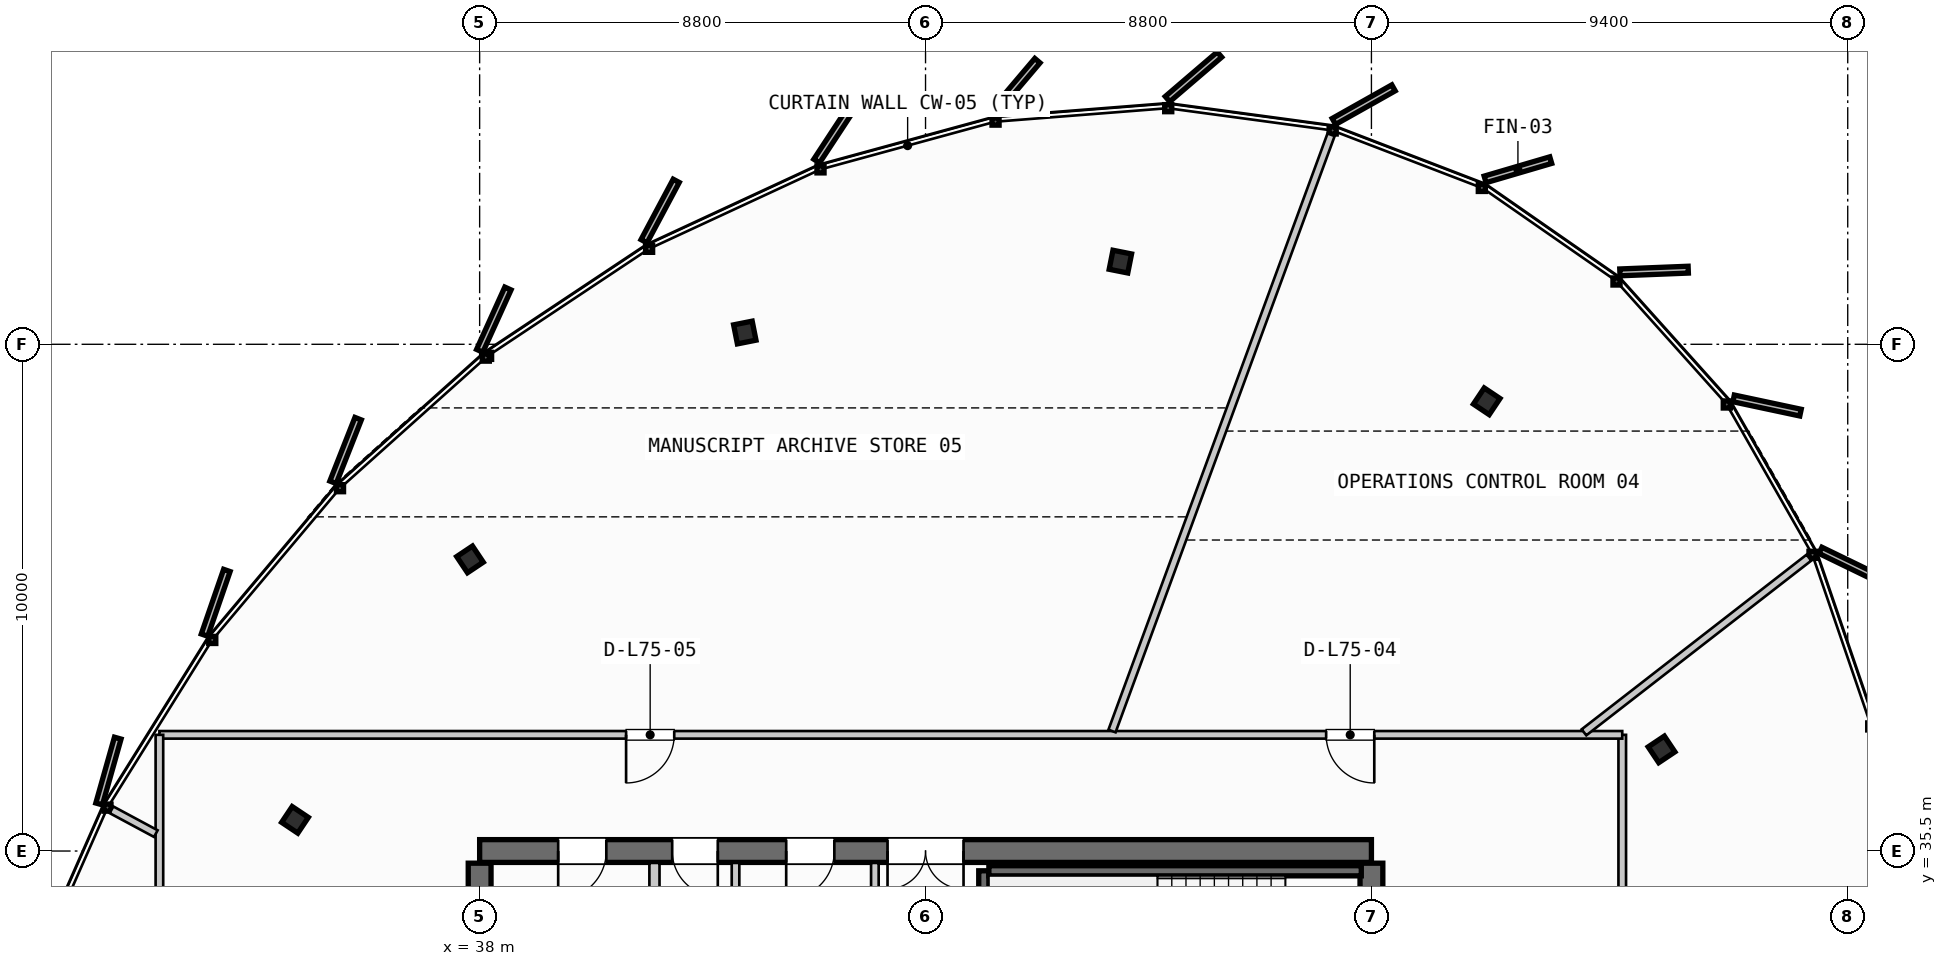
"""IFC4 building model, lengths in metres.
Left out: names, types, materials, properties, quantities, classifications, styles, units other than length and angle.
Written with IfcOpenShell. Run it as: python <this file> out.ifc"""

import sys

from ifc_helpers import new_model, si_unit, direction, frame, frame_2d, origin, origin_2d, place, context, subcontext, project, spatial, rectangle, i_section, extrude, source, transform, mapped, element, fill, save


model = new_model("IFC4")
c1 = context("Model", 3, precision=1e-05, world=origin(), true_north=direction((0.0, 1.0)))
c2 = subcontext(c1, "Body", "Model", "MODEL_VIEW")
j1 = project(units=[si_unit("LENGTHUNIT", "METRE"), si_unit("PLANEANGLEUNIT", "RADIAN")], contexts=[c1])
p1 = place(None, origin())
s1 = spatial("IfcSite", under=j1, at=p1, CompositionType="ELEMENT")
p2 = place(p1, origin())
s2 = spatial("IfcBuilding", under=s1, at=p2, CompositionType="ELEMENT")
p3 = place(p2, frame((0.0, 0.0, 283.6)))
s3 = spatial("IfcBuildingStorey", under=s2, at=p3, CompositionType="ELEMENT", Elevation=283.6)
p4 = place(p3, frame((55.6, 35.5, 0.0), z_axis=(0.0, 0.0, 1.0), x_axis=(-1.0, 0.0, 0.0)))
e1 = element("IfcWall", 1, at=p4, inside=s3, PredefinedType="SHEAR", context=c2, shape_type="SweptSolid", body=[
    extrude(rectangle(XDim=17.6, YDim=0.45, at=frame_2d((8.8, 0.0))), origin(), (0.0, 0.0, 1.0), 3.21),
])
p5 = place(p4, frame((8.05, 0.0, 0.0)))
e2 = element("IfcOpeningElement", 2, at=p5, cuts=e1, PredefinedType="OPENING", context=c2, shape_type="SweptSolid", body=[
    extrude(rectangle(XDim=1.5, YDim=2.2, at=frame_2d((0.75, 1.1))), frame((0.0, 0.235, 0.0), z_axis=(0.0, -1.0, 0.0), x_axis=(1.0, 0.0, 0.0)), (0.0, 0.0, 1.0), 0.47),
])
p6 = place(p4, frame((15.1, 0.0, 0.0)))
e3 = element("IfcOpeningElement", 3, at=p6, cuts=e1, PredefinedType="OPENING", context=c2, shape_type="SweptSolid", body=[
    extrude(rectangle(XDim=0.95, YDim=2.15, at=frame_2d((0.475, 1.075))), frame((0.0, 0.235, 0.0), z_axis=(0.0, -1.0, 0.0), x_axis=(1.0, 0.0, 0.0)), (0.0, 0.0, 1.0), 0.47),
])
p7 = place(p4, frame((12.9, 0.0, 0.0)))
e4 = element("IfcOpeningElement", 4, at=p7, cuts=e1, PredefinedType="OPENING", context=c2, shape_type="SweptSolid", body=[
    extrude(rectangle(XDim=0.9, YDim=2.15, at=frame_2d((0.45, 1.075))), frame((0.0, 0.235, 0.0), z_axis=(0.0, -1.0, 0.0), x_axis=(1.0, 0.0, 0.0)), (0.0, 0.0, 1.0), 0.47),
])
p8 = place(p4, frame((10.6, 0.0, 0.0)))
e5 = element("IfcOpeningElement", 5, at=p8, cuts=e1, PredefinedType="OPENING", context=c2, shape_type="SweptSolid", body=[
    extrude(rectangle(XDim=0.95, YDim=2.15, at=frame_2d((0.475, 1.075))), frame((0.0, 0.235, 0.0), z_axis=(0.0, -1.0, 0.0), x_axis=(1.0, 0.0, 0.0)), (0.0, 0.0, 1.0), 0.47),
])
p9 = place(p3, frame((38.0, 35.26, 0.0), z_axis=(0.0, 0.0, 1.0), x_axis=(0.0, -1.0, 0.0)))
e6 = element("IfcWall", 6, at=p9, inside=s3, PredefinedType="SHEAR", context=c2, shape_type="SweptSolid", body=[
    extrude(rectangle(XDim=14.92, YDim=0.45, at=frame_2d((7.46, 0.0))), origin(), (0.0, 0.0, 1.0), 3.21),
])
p10 = place(p9, frame((5.21, 0.0, 0.0)))
e7 = element("IfcOpeningElement", 7, at=p10, cuts=e6, PredefinedType="OPENING", context=c2, shape_type="SweptSolid", body=[
    extrude(rectangle(XDim=1.1, YDim=2.2, at=frame_2d((0.55, 1.1))), frame((0.0, 0.235, 0.0), z_axis=(0.0, -1.0, 0.0), x_axis=(1.0, 0.0, 0.0)), (0.0, 0.0, 1.0), 0.47),
])
p11 = place(p3, frame((55.6, 20.34, 0.0), z_axis=(0.0, 0.0, 1.0), x_axis=(0.0, 1.0, 0.0)))
e8 = element("IfcWall", 8, at=p11, inside=s3, PredefinedType="SHEAR", context=c2, shape_type="SweptSolid", body=[
    extrude(rectangle(XDim=14.92, YDim=0.45, at=frame_2d((7.46, 0.0))), origin(), (0.0, 0.0, 1.0), 3.21),
])
p12 = place(p11, frame((12.71, 0.0, 0.0)))
e9 = element("IfcOpeningElement", 9, at=p12, cuts=e8, PredefinedType="OPENING", context=c2, shape_type="SweptSolid", body=[
    extrude(rectangle(XDim=1.05, YDim=2.15, at=frame_2d((0.525, 1.075))), frame((0.0, 0.235, 0.0), z_axis=(0.0, -1.0, 0.0), x_axis=(1.0, 0.0, 0.0)), (0.0, 0.0, 1.0), 0.47),
])
p13 = place(p11, frame((8.61, 0.0, 0.0)))
e10 = element("IfcOpeningElement", 10, at=p13, cuts=e8, PredefinedType="OPENING", context=c2, shape_type="SweptSolid", body=[
    extrude(rectangle(XDim=1.1, YDim=2.2, at=frame_2d((0.55, 1.1))), frame((0.0, 0.235, 0.0), z_axis=(0.0, -1.0, 0.0), x_axis=(1.0, 0.0, 0.0)), (0.0, 0.0, 1.0), 0.47),
])
m1 = source(origin(), c2, "Body", "SweptSolid", [
    extrude(i_section(OverallWidth=0.374, OverallDepth=0.383, WebThickness=0.017, FlangeThickness=0.026, FilletRadius=0.015, at=origin_2d()), origin(), (0.0, 0.0, 1.0), 3.21),
])
for number, where, z_axis, x_axis in (
    (11, (61.326, 37.506, 0.0), (0.0, 0.0, 1.0), (0.831, 0.556, 0.0)),
    (12, (57.875, 44.375, 0.0), (0.0, 0.0, 1.0), (0.556, 0.831, 0.0)),
    (13, (50.645, 47.132, 0.0), (0.0, 0.0, 1.0), (0.195, 0.981, 0.0)),
    (14, (43.233, 45.732, 0.0), (0.0, 0.0, 1.0), (-0.195, 0.981, 0.0)),
    (15, (37.81, 41.255, 0.0), (0.0, 0.0, 1.0), (-0.556, 0.831, 0.0)),
    (16, (34.356, 36.115, 0.0), (0.0, 0.0, 1.0), (-0.831, 0.556, 0.0)),
):
    element("IfcColumn", number, at=place(p3, frame(where, z_axis=z_axis, x_axis=x_axis)), inside=s3, PredefinedType="COLUMN", context=c2, shape_type="MappedRepresentation", body=[
        mapped(m1, transform((0.0, 0.0, 0.0), scale=1.0)),
    ])
p14 = place(p3, frame((47.95, 32.05, 0.0), z_axis=(0.0, 0.0, 1.0), x_axis=(0.0, 1.0, 0.0)))
e17 = element("IfcWall", 17, at=p14, inside=s3, PredefinedType="SHEAR", context=c2, shape_type="SweptSolid", body=[
    extrude(rectangle(XDim=3.06, YDim=0.2, at=frame_2d((1.53, 0.0))), origin(), (0.0, 0.0, 1.0), 3.21),
])
p15 = place(p3, frame((48.05, 35.11, 0.0), z_axis=(0.0, 0.0, 1.0), x_axis=(1.0, 0.0, 0.0)))
e18 = element("IfcWall", 18, at=p15, inside=s3, PredefinedType="SHEAR", context=c2, shape_type="SweptSolid", body=[
    extrude(rectangle(XDim=7.35, YDim=0.2, at=frame_2d((3.675, 0.0))), origin(), (0.0, 0.0, 1.0), 3.21),
])
p16 = place(p3, frame((41.45, 31.85, 0.0), z_axis=(0.0, 0.0, 1.0), x_axis=(0.0, 1.0, 0.0)))
e19 = element("IfcWall", 19, at=p16, inside=s3, PredefinedType="PARTITIONING", context=c2, shape_type="SweptSolid", body=[
    extrude(rectangle(XDim=3.415, YDim=0.2, at=frame_2d((1.708, 0.0))), origin(), (0.0, 0.0, 1.0), 2.455),
])
p17 = place(p3, frame((45.8, 31.85, 0.0), z_axis=(0.0, 0.0, 1.0), x_axis=(0.0, 1.0, 0.0)))
e20 = element("IfcWall", 20, at=p17, inside=s3, PredefinedType="PARTITIONING", context=c2, shape_type="SweptSolid", body=[
    extrude(rectangle(XDim=3.415, YDim=0.15, at=frame_2d((1.708, 0.0))), origin(), (0.0, 0.0, 1.0), 2.455),
])
p18 = place(p3, frame((43.05, 31.85, 0.0), z_axis=(0.0, 0.0, 1.0), x_axis=(0.0, 1.0, 0.0)))
e21 = element("IfcWall", 21, at=p18, inside=s3, PredefinedType="PLUMBINGWALL", context=c2, shape_type="SweptSolid", body=[
    extrude(rectangle(XDim=3.415, YDim=0.15, at=frame_2d((1.708, 0.0))), origin(), (0.0, 0.0, 1.0), 2.455),
])
p19 = place(p3, frame((60.55, 17.807, 0.0), z_axis=(0.0, 0.0, 1.0), x_axis=(0.0, 1.0, 0.0)))
e22 = element("IfcWall", 22, at=p19, inside=s3, PredefinedType="PARTITIONING", context=c2, shape_type="SweptSolid", body=[
    extrude(rectangle(XDim=19.986, YDim=0.15, at=frame_2d((9.993, 0.0))), origin(), (0.0, 0.0, 1.0), 2.455),
])
p20 = place(p19, frame((2.877, 0.0, 0.0)))
e23 = element("IfcOpeningElement", 23, at=p20, cuts=e22, PredefinedType="OPENING", context=c2, shape_type="SweptSolid", body=[
    extrude(rectangle(XDim=0.95, YDim=2.15, at=frame_2d((0.475, 1.075))), frame((0.0, 0.085, 0.0), z_axis=(0.0, -1.0, 0.0), x_axis=(1.0, 0.0, 0.0)), (0.0, 0.0, 1.0), 0.17),
])
p21 = place(p19, frame((10.685, 0.0, 0.0)))
e24 = element("IfcOpeningElement", 24, at=p21, cuts=e22, PredefinedType="OPENING", context=c2, shape_type="SweptSolid", body=[
    extrude(rectangle(XDim=0.95, YDim=2.15, at=frame_2d((0.475, 1.075))), frame((0.0, 0.085, 0.0), z_axis=(0.0, -1.0, 0.0), x_axis=(1.0, 0.0, 0.0)), (0.0, 0.0, 1.0), 0.17),
])
p22 = place(p3, frame((60.55, 37.793, 0.0), z_axis=(0.0, 0.0, 1.0), x_axis=(-1.0, 0.0, 0.0)))
e25 = element("IfcWall", 25, at=p22, inside=s3, PredefinedType="PARTITIONING", context=c2, shape_type="SweptSolid", body=[
    extrude(rectangle(XDim=28.87, YDim=0.15, at=frame_2d((14.435, 0.0))), origin(), (0.0, 0.0, 1.0), 2.455),
])
p23 = place(p22, frame((4.894, 0.0, 0.0)))
e26 = element("IfcOpeningElement", 26, at=p23, cuts=e25, PredefinedType="OPENING", context=c2, shape_type="SweptSolid", body=[
    extrude(rectangle(XDim=0.95, YDim=2.15, at=frame_2d((0.475, 1.075))), frame((0.0, 0.085, 0.0), z_axis=(0.0, -1.0, 0.0), x_axis=(1.0, 0.0, 0.0)), (0.0, 0.0, 1.0), 0.17),
])
p24 = place(p22, frame((18.71, 0.0, 0.0)))
e27 = element("IfcOpeningElement", 27, at=p24, cuts=e25, PredefinedType="OPENING", context=c2, shape_type="SweptSolid", body=[
    extrude(rectangle(XDim=0.95, YDim=2.15, at=frame_2d((0.475, 1.075))), frame((0.0, 0.085, 0.0), z_axis=(0.0, -1.0, 0.0), x_axis=(1.0, 0.0, 0.0)), (0.0, 0.0, 1.0), 0.17),
])
p25 = place(p3, frame((31.68, 37.793, 0.0), z_axis=(0.0, 0.0, 1.0), x_axis=(0.0, -1.0, 0.0)))
e28 = element("IfcWall", 28, at=p25, inside=s3, PredefinedType="PARTITIONING", context=c2, shape_type="SweptSolid", body=[
    extrude(rectangle(XDim=19.986, YDim=0.15, at=frame_2d((9.993, 0.0))), origin(), (0.0, 0.0, 1.0), 2.455),
])
p26 = place(p25, frame((4.973, 0.0, 0.0)))
e29 = element("IfcOpeningElement", 29, at=p26, cuts=e28, PredefinedType="OPENING", context=c2, shape_type="SweptSolid", body=[
    extrude(rectangle(XDim=0.95, YDim=2.15, at=frame_2d((0.475, 1.075))), frame((0.0, 0.085, 0.0), z_axis=(0.0, -1.0, 0.0), x_axis=(1.0, 0.0, 0.0)), (0.0, 0.0, 1.0), 0.17),
])
p27 = place(p25, frame((14.561, 0.0, 0.0)))
e30 = element("IfcOpeningElement", 30, at=p27, cuts=e28, PredefinedType="OPENING", context=c2, shape_type="SweptSolid", body=[
    extrude(rectangle(XDim=0.95, YDim=2.15, at=frame_2d((0.475, 1.075))), frame((0.0, 0.085, 0.0), z_axis=(0.0, -1.0, 0.0), x_axis=(1.0, 0.0, 0.0)), (0.0, 0.0, 1.0), 0.17),
])
p28 = place(p3, frame((59.795, 37.842, 0.0), z_axis=(0.0, 0.0, 1.0), x_axis=(0.789784727897, 0.613384124004, 0.0)))
e31 = element("IfcWall", 31, at=p28, inside=s3, PredefinedType="PARTITIONING", context=c2, shape_type="SweptSolid", body=[
    extrude(rectangle(XDim=5.62, YDim=0.15, at=frame_2d((2.81, 0.0))), origin(), (0.0, 0.0, 1.0), 2.455),
])
p29 = place(p3, frame((50.48, 37.868, 0.0), z_axis=(0.0, 0.0, 1.0), x_axis=(0.344902908423, 0.93863836687, 0.0)))
e32 = element("IfcWall", 32, at=p29, inside=s3, PredefinedType="PARTITIONING", context=c2, shape_type="SweptSolid", body=[
    extrude(rectangle(XDim=12.536, YDim=0.15, at=frame_2d((6.268, 0.0))), origin(), (0.0, 0.0, 1.0), 2.455),
])
p30 = place(p3, frame((31.61, 35.844, 0.0), z_axis=(0.0, 0.0, 1.0), x_axis=(-0.880920446262, 0.47326437364, 0.0)))
e33 = element("IfcWall", 33, at=p30, inside=s3, PredefinedType="PARTITIONING", context=c2, shape_type="SweptSolid", body=[
    extrude(rectangle(XDim=0.994, YDim=0.15, at=frame_2d((0.497, 0.0))), origin(), (0.0, 0.0, 1.0), 2.455),
])
m2 = source(origin(), c2, "Body", "SweptSolid", [
    extrude(rectangle(XDim=1.5, YDim=2.2, at=frame_2d((0.75, 1.1))), frame((0.0, 0.025, 0.0), z_axis=(0.0, -1.0, 0.0), x_axis=(1.0, 0.0, 0.0)), (0.0, 0.0, 1.0), 0.05),
])
p31 = place(p5, origin())
e34 = element("IfcDoor", 34, at=p31, inside=s3, OperationType="DOUBLE_DOOR_SINGLE_SWING", PredefinedType="DOOR", context=c2, shape_type="MappedRepresentation", body=[
    mapped(m2, transform((0.0, 0.0, 0.0), scale=1.0)),
])
fill(e2, e34)
m3 = source(origin(), c2, "Body", "SweptSolid", [
    extrude(rectangle(XDim=0.95, YDim=2.15, at=frame_2d((0.475, 1.075))), frame((0.0, 0.025, 0.0), z_axis=(0.0, -1.0, 0.0), x_axis=(1.0, 0.0, 0.0)), (0.0, 0.0, 1.0), 0.05),
])
p32 = place(p6, origin())
e35 = element("IfcDoor", 35, at=p32, inside=s3, OperationType="SINGLE_SWING_RIGHT", PredefinedType="DOOR", context=c2, shape_type="MappedRepresentation", body=[
    mapped(m3, transform((0.0, 0.0, 0.0), scale=1.0)),
])
fill(e3, e35)
m4 = source(origin(), c2, "Body", "SweptSolid", [
    extrude(rectangle(XDim=0.9, YDim=2.15, at=frame_2d((0.45, 1.075))), frame((0.0, 0.025, 0.0), z_axis=(0.0, -1.0, 0.0), x_axis=(1.0, 0.0, 0.0)), (0.0, 0.0, 1.0), 0.05),
])
p33 = place(p7, origin())
e36 = element("IfcDoor", 36, at=p33, inside=s3, OperationType="SINGLE_SWING_LEFT", PredefinedType="DOOR", context=c2, shape_type="MappedRepresentation", body=[
    mapped(m4, transform((0.0, 0.0, 0.0), scale=1.0)),
])
fill(e4, e36)
p34 = place(p8, origin())
e37 = element("IfcDoor", 37, at=p34, inside=s3, OperationType="SINGLE_SWING_RIGHT", PredefinedType="DOOR", context=c2, shape_type="MappedRepresentation", body=[
    mapped(m3, transform((0.0, 0.0, 0.0), scale=1.0)),
])
fill(e5, e37)
p35 = place(p23, origin())
e38 = element("IfcDoor", 38, at=p35, inside=s3, OperationType="SINGLE_SWING_LEFT", PredefinedType="DOOR", context=c2, shape_type="MappedRepresentation", body=[
    mapped(m3, transform((0.0, 0.0, 0.0), scale=1.0)),
])
fill(e26, e38)
p36 = place(p24, origin())
e39 = element("IfcDoor", 39, at=p36, inside=s3, OperationType="SINGLE_SWING_RIGHT", PredefinedType="DOOR", context=c2, shape_type="MappedRepresentation", body=[
    mapped(m3, transform((0.0, 0.0, 0.0), scale=1.0)),
])
fill(e27, e39)
save(model, sys.argv[1])
